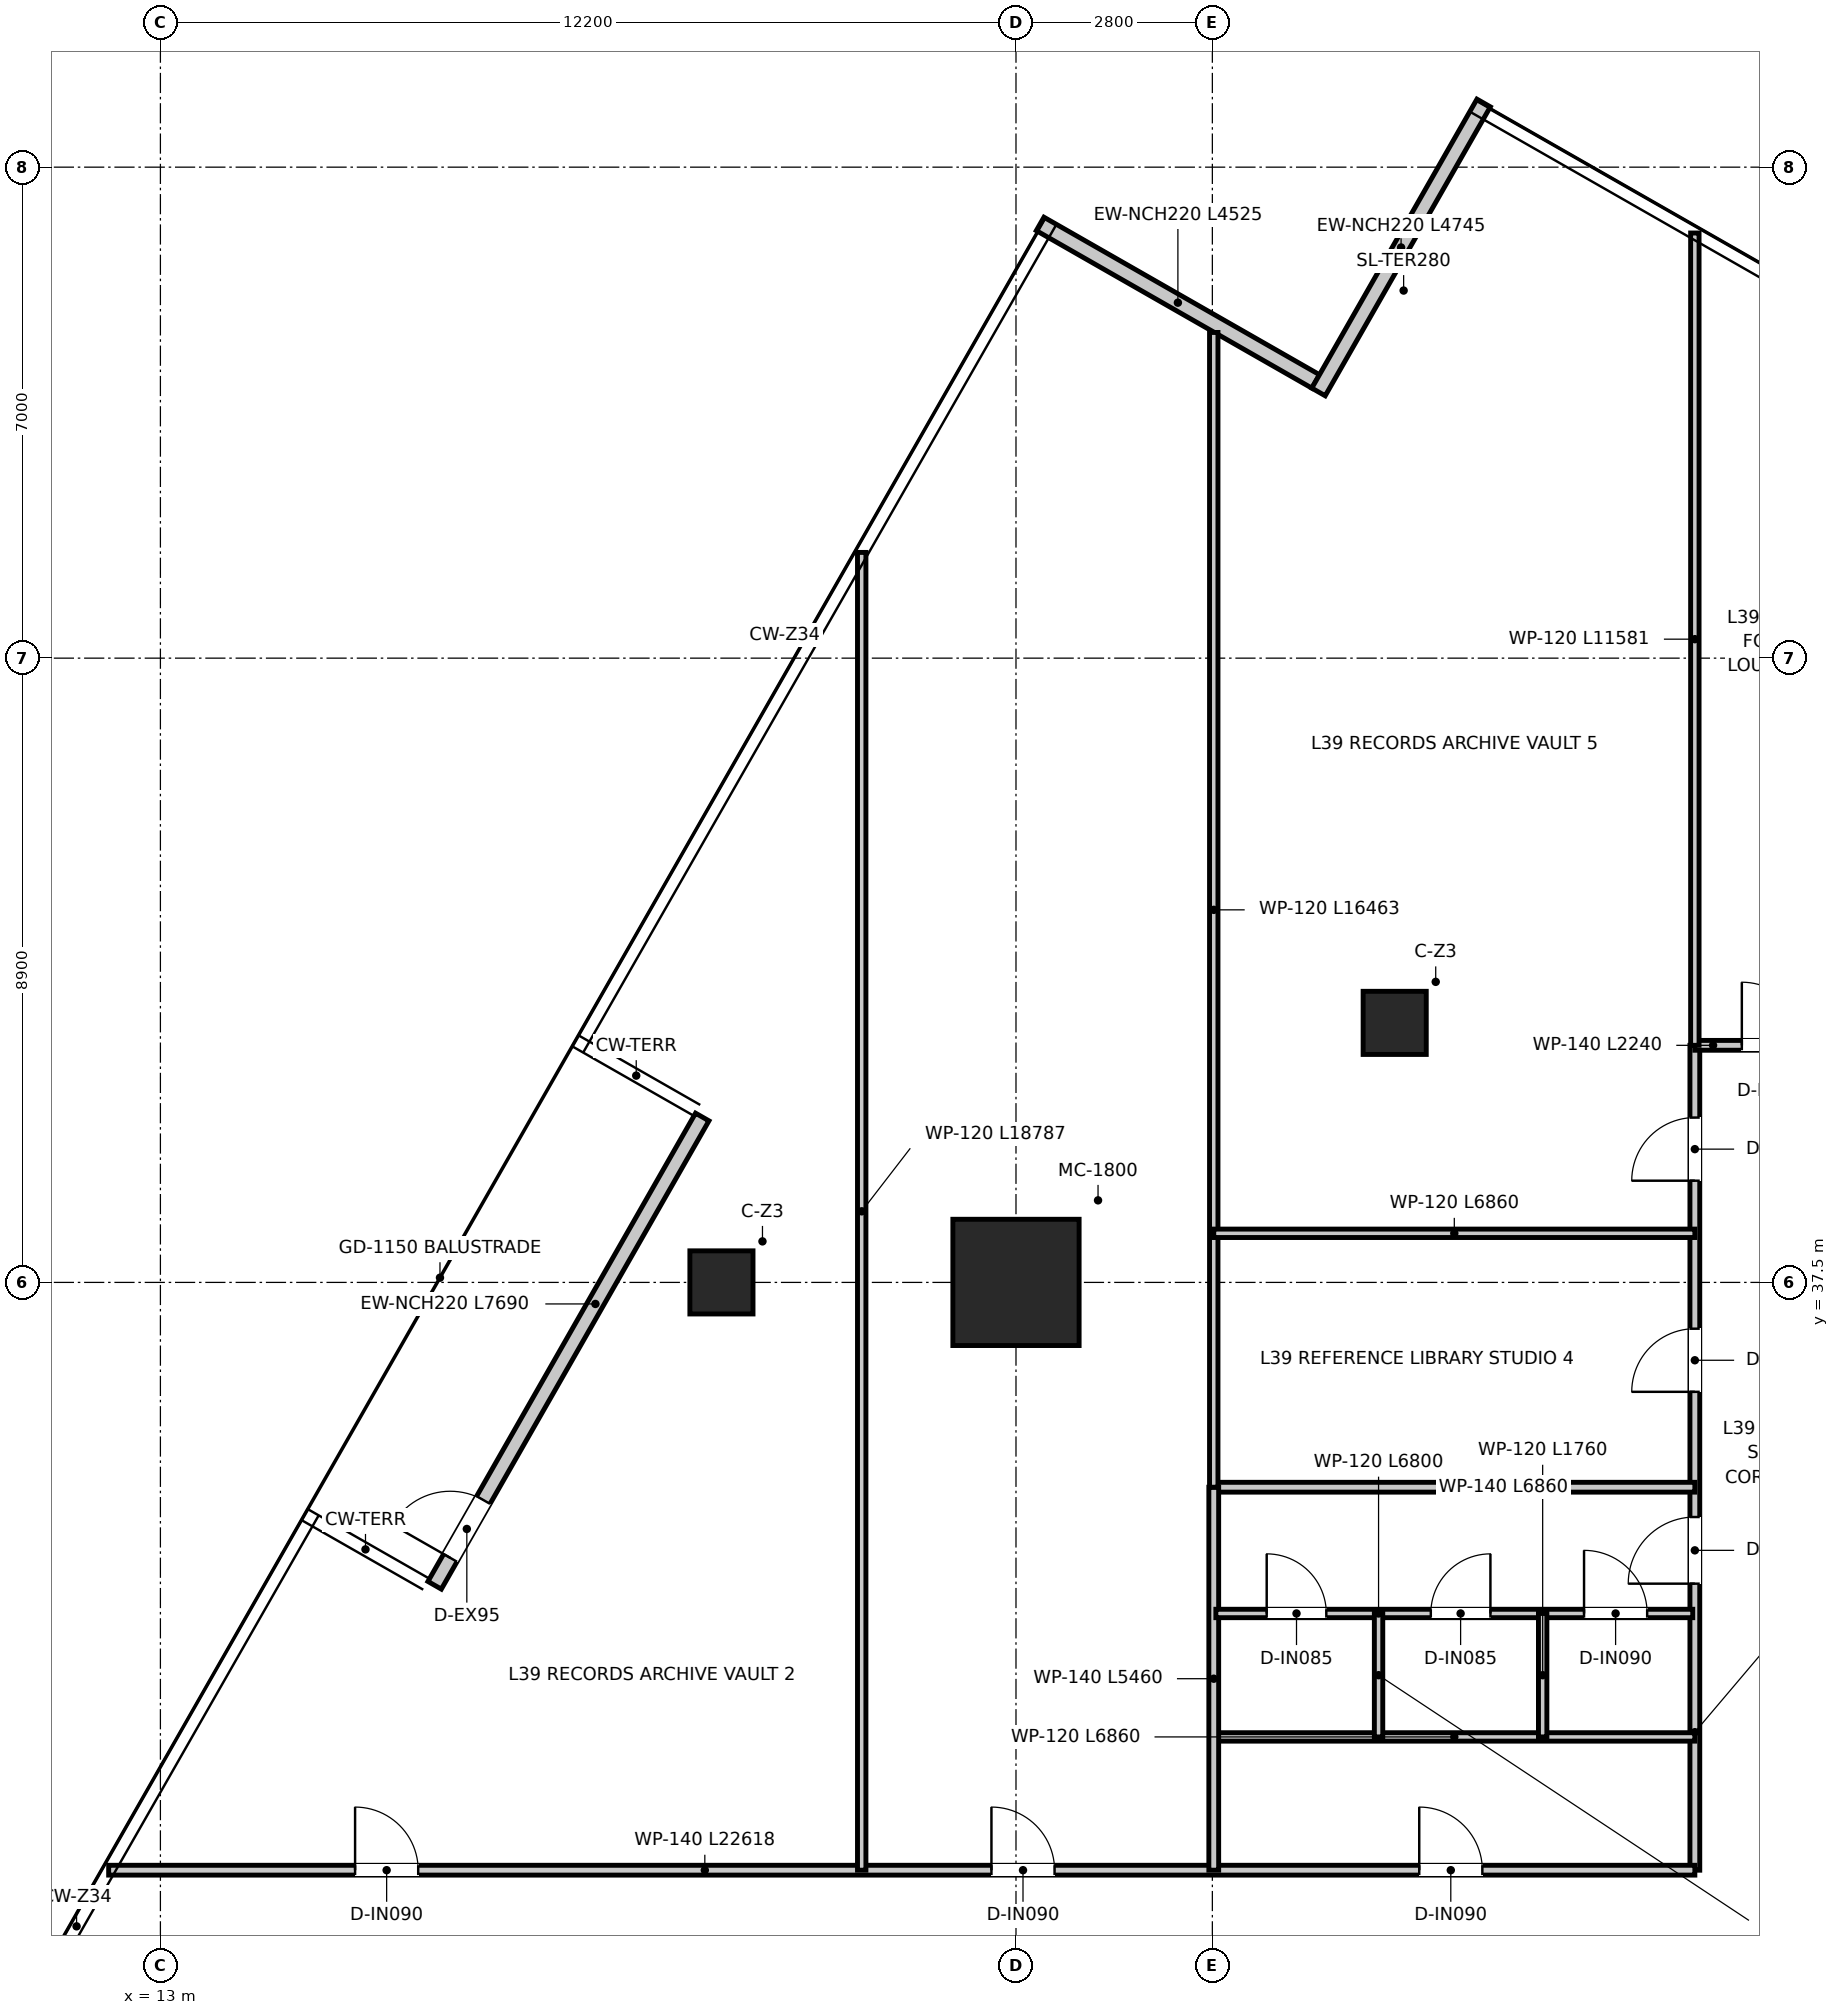
"""IFC4 building model, lengths in metres.
Left out: names, types, materials, properties, quantities, classifications, styles, units other than length and angle.
Written with IfcOpenShell. Run it as: python <this file> out.ifc"""

import sys

from ifc_helpers import new_model, si_unit, direction, frame, frame_2d, origin, origin_2d, place, context, subcontext, project, spatial, rectangle, extrude, source, transform, mapped, element, fill, save


model = new_model("IFC4")
c1 = context("Model", 3, precision=1e-05, world=origin(), true_north=direction((0.0, 1.0)))
c2 = subcontext(c1, "Body", "Model", "MODEL_VIEW")
j1 = project(units=[si_unit("LENGTHUNIT", "METRE"), si_unit("PLANEANGLEUNIT", "RADIAN")], contexts=[c1])
p1 = place(None, origin())
s1 = spatial("IfcSite", under=j1, at=p1, CompositionType="ELEMENT")
p2 = place(p1, origin())
s2 = spatial("IfcBuilding", under=s1, at=p2, CompositionType="ELEMENT")
p3 = place(p2, frame((0.0, 0.0, 162.0)))
s3 = spatial("IfcBuildingStorey", under=s2, at=p3, CompositionType="ELEMENT", Elevation=162.0)
m1 = source(origin(), c2, "Body", "SweptSolid", [
    extrude(rectangle(XDim=1.8, YDim=1.8, at=origin_2d()), origin(), (0.0, 0.0, 1.0), 3.95),
])
p4 = place(p3, frame((25.2, 37.5, 0.0), z_axis=(0.0, 0.0, 1.0), x_axis=(1.0, 0.0, 0.0)))
e1 = element("IfcColumn", 1, at=p4, inside=s3, PredefinedType="USERDEFINED", context=c2, shape_type="MappedRepresentation", body=[
    mapped(m1, transform((0.0, 0.0, 0.0), x_axis=(1.0, 0.0, 0.0), y_axis=(0.0, 1.0, 0.0), z_axis=(0.0, 0.0, 1.0), scale=1.0)),
])
m2 = source(origin(), c2, "Body", "SweptSolid", [
    extrude(rectangle(XDim=0.9, YDim=0.9, at=origin_2d()), origin(), (0.0, 0.0, 1.0), 3.95),
])
for number, where, z_axis, x_axis in (
    (2, (21.0, 37.5, 0.0), (0.0, 0.0, 1.0), (1.0, 0.0, 0.0)),
    (3, (30.6, 41.2, 0.0), (0.0, 0.0, 1.0), (1.0, 0.0, 0.0)),
):
    element("IfcColumn", number, at=place(p3, frame(where, z_axis=z_axis, x_axis=x_axis)), inside=s3, PredefinedType="COLUMN", context=c2, shape_type="MappedRepresentation", body=[
        mapped(m2, transform((0.0, 0.0, 0.0), x_axis=(1.0, 0.0, 0.0), y_axis=(0.0, 1.0, 0.0), z_axis=(0.0, 0.0, 1.0), scale=1.0)),
    ])
p5 = place(p3, frame((29.473, 50.345, 0.0), z_axis=(0.0, 0.0, 1.0), x_axis=(-0.868170087613, 0.496266761908, 0.0)))
e4 = element("IfcWall", 4, at=p5, inside=s3, PredefinedType="ELEMENTEDWALL", context=c2, shape_type="SweptSolid", body=[
    extrude(rectangle(XDim=4.525, YDim=0.22, at=frame_2d((2.262, 0.0))), origin(), (0.0, 0.0, 1.0), 3.67),
])
p6 = place(p3, frame((16.91, 33.182, 0.0), z_axis=(0.0, 0.0, 1.0), x_axis=(0.496214153759, 0.868200157572, 0.0)))
e5 = element("IfcWall", 5, at=p6, inside=s3, PredefinedType="ELEMENTEDWALL", context=c2, shape_type="SweptSolid", body=[
    extrude(rectangle(XDim=7.69, YDim=0.22, at=frame_2d((3.845, 0.0))), origin(), (0.0, 0.0, 1.0), 3.67),
])
p7 = place(p6, frame((0.45, 0.0, 0.0)))
e6 = element("IfcOpeningElement", 6, at=p7, cuts=e5, PredefinedType="OPENING", context=c2, shape_type="SweptSolid", body=[
    extrude(rectangle(XDim=0.95, YDim=2.1, at=frame_2d((0.475, 1.05))), frame((0.0, 0.12, 0.0), z_axis=(0.0, -1.0, 0.0), x_axis=(1.0, 0.0, 0.0)), (0.0, 0.0, 1.0), 0.24),
])
p8 = place(p3, frame((31.868, 54.315, 0.0), z_axis=(0.0, 0.0, 1.0), x_axis=(-0.496205429031, -0.868205144076, 0.0)))
e7 = element("IfcWall", 7, at=p8, inside=s3, PredefinedType="ELEMENTEDWALL", context=c2, shape_type="SweptSolid", body=[
    extrude(rectangle(XDim=4.745, YDim=0.22, at=frame_2d((2.373, 0.0))), origin(), (0.0, 0.0, 1.0), 3.67),
])
p9 = place(p3, frame((34.88, 29.12, 0.0), z_axis=(0.0, 0.0, 1.0), x_axis=(0.0, 1.0, 0.0)))
e8 = element("IfcWall", 8, at=p9, inside=s3, PredefinedType="PARTITIONING", context=c2, shape_type="SweptSolid", body=[
    extrude(rectangle(XDim=11.76, YDim=0.14, at=frame_2d((5.88, 0.0))), origin(), (0.0, 0.0, 1.0), 3.03),
])
p10 = place(p9, frame((4.085, 0.0, 0.0)))
e9 = element("IfcOpeningElement", 9, at=p10, cuts=e8, PredefinedType="OPENING", context=c2, shape_type="SweptSolid", body=[
    extrude(rectangle(XDim=0.95, YDim=2.1, at=frame_2d((0.475, 1.05))), frame((0.0, 0.08, 0.0), z_axis=(0.0, -1.0, 0.0), x_axis=(1.0, 0.0, 0.0)), (0.0, 0.0, 1.0), 0.16),
])
p11 = place(p9, frame((6.82, 0.0, 0.0)))
e10 = element("IfcOpeningElement", 10, at=p11, cuts=e8, PredefinedType="OPENING", context=c2, shape_type="SweptSolid", body=[
    extrude(rectangle(XDim=0.9, YDim=2.1, at=frame_2d((0.45, 1.05))), frame((0.0, 0.08, 0.0), z_axis=(0.0, -1.0, 0.0), x_axis=(1.0, 0.0, 0.0)), (0.0, 0.0, 1.0), 0.16),
])
p12 = place(p9, frame((9.83, 0.0, 0.0)))
e11 = element("IfcOpeningElement", 11, at=p12, cuts=e8, PredefinedType="OPENING", context=c2, shape_type="SweptSolid", body=[
    extrude(rectangle(XDim=0.9, YDim=2.1, at=frame_2d((0.45, 1.05))), frame((0.0, 0.08, 0.0), z_axis=(0.0, -1.0, 0.0), x_axis=(1.0, 0.0, 0.0)), (0.0, 0.0, 1.0), 0.16),
])
p13 = place(p3, frame((34.88, 40.88, 0.0), z_axis=(0.0, 0.0, 1.0), x_axis=(1.0, 0.0, 0.0)))
e12 = element("IfcWall", 12, at=p13, inside=s3, PredefinedType="PARTITIONING", context=c2, shape_type="SweptSolid", body=[
    extrude(rectangle(XDim=2.24, YDim=0.14, at=frame_2d((1.12, 0.0))), origin(), (0.0, 0.0, 1.0), 3.67),
])
p14 = place(p13, frame((0.67, 0.0, 0.0)))
e13 = element("IfcOpeningElement", 13, at=p14, cuts=e12, PredefinedType="OPENING", context=c2, shape_type="SweptSolid", body=[
    extrude(rectangle(XDim=0.9, YDim=2.1, at=frame_2d((0.45, 1.05))), frame((0.0, 0.08, 0.0), z_axis=(0.0, -1.0, 0.0), x_axis=(1.0, 0.0, 0.0)), (0.0, 0.0, 1.0), 0.16),
])
p15 = place(p3, frame((12.262, 29.12, 0.0), z_axis=(0.0, 0.0, 1.0), x_axis=(1.0, 0.0, 0.0)))
e14 = element("IfcWall", 14, at=p15, inside=s3, PredefinedType="PARTITIONING", context=c2, shape_type="SweptSolid", body=[
    extrude(rectangle(XDim=22.618, YDim=0.14, at=frame_2d((11.309, 0.0))), origin(), (0.0, 0.0, 1.0), 3.03),
])
p16 = place(p15, frame((18.688, 0.0, 0.0)))
e15 = element("IfcOpeningElement", 15, at=p16, cuts=e14, PredefinedType="OPENING", context=c2, shape_type="SweptSolid", body=[
    extrude(rectangle(XDim=0.9, YDim=2.1, at=frame_2d((0.45, 1.05))), frame((0.0, 0.08, 0.0), z_axis=(0.0, -1.0, 0.0), x_axis=(1.0, 0.0, 0.0)), (0.0, 0.0, 1.0), 0.16),
])
p17 = place(p15, frame((3.514, 0.0, 0.0)))
e16 = element("IfcOpeningElement", 16, at=p17, cuts=e14, PredefinedType="OPENING", context=c2, shape_type="SweptSolid", body=[
    extrude(rectangle(XDim=0.9, YDim=2.1, at=frame_2d((0.45, 1.05))), frame((0.0, 0.08, 0.0), z_axis=(0.0, -1.0, 0.0), x_axis=(1.0, 0.0, 0.0)), (0.0, 0.0, 1.0), 0.16),
])
p18 = place(p15, frame((12.588, 0.0, 0.0)))
e17 = element("IfcOpeningElement", 17, at=p18, cuts=e14, PredefinedType="OPENING", context=c2, shape_type="SweptSolid", body=[
    extrude(rectangle(XDim=0.9, YDim=2.1, at=frame_2d((0.45, 1.05))), frame((0.0, 0.08, 0.0), z_axis=(0.0, -1.0, 0.0), x_axis=(1.0, 0.0, 0.0)), (0.0, 0.0, 1.0), 0.16),
])
p19 = place(p3, frame((28.02, 31.02, 0.0), z_axis=(0.0, 0.0, 1.0), x_axis=(1.0, 0.0, 0.0)))
e18 = element("IfcWall", 18, at=p19, inside=s3, PredefinedType="PARTITIONING", context=c2, shape_type="SweptSolid", body=[
    extrude(rectangle(XDim=6.86, YDim=0.12, at=frame_2d((3.43, 0.0))), origin(), (0.0, 0.0, 1.0), 3.08),
])
p20 = place(p3, frame((28.02, 34.58, 0.0), z_axis=(0.0, 0.0, 1.0), x_axis=(1.0, 0.0, 0.0)))
e19 = element("IfcWall", 19, at=p20, inside=s3, PredefinedType="PARTITIONING", context=c2, shape_type="SweptSolid", body=[
    extrude(rectangle(XDim=6.86, YDim=0.14, at=frame_2d((3.43, 0.0))), origin(), (0.0, 0.0, 1.0), 3.08),
])
p21 = place(p3, frame((28.02, 29.12, 0.0), z_axis=(0.0, 0.0, 1.0), x_axis=(0.0, 1.0, 0.0)))
e20 = element("IfcWall", 20, at=p21, inside=s3, PredefinedType="PARTITIONING", context=c2, shape_type="SweptSolid", body=[
    extrude(rectangle(XDim=5.46, YDim=0.14, at=frame_2d((2.73, 0.0))), origin(), (0.0, 0.0, 1.0), 3.31),
])
p22 = place(p3, frame((28.05, 32.78, 0.0), z_axis=(0.0, 0.0, 1.0), x_axis=(1.0, 0.0, 0.0)))
e21 = element("IfcWall", 21, at=p22, inside=s3, PredefinedType="PARTITIONING", context=c2, shape_type="SweptSolid", body=[
    extrude(rectangle(XDim=6.8, YDim=0.12, at=frame_2d((3.4, 0.0))), origin(), (0.0, 0.0, 1.0), 3.08),
])
p23 = place(p22, frame((0.725, 0.0, 0.0)))
e22 = element("IfcOpeningElement", 22, at=p23, cuts=e21, PredefinedType="OPENING", context=c2, shape_type="SweptSolid", body=[
    extrude(rectangle(XDim=0.85, YDim=2.1, at=frame_2d((0.425, 1.05))), frame((0.0, 0.07, 0.0), z_axis=(0.0, -1.0, 0.0), x_axis=(1.0, 0.0, 0.0)), (0.0, 0.0, 1.0), 0.14),
])
p24 = place(p22, frame((3.065, 0.0, 0.0)))
e23 = element("IfcOpeningElement", 23, at=p24, cuts=e21, PredefinedType="OPENING", context=c2, shape_type="SweptSolid", body=[
    extrude(rectangle(XDim=0.85, YDim=2.1, at=frame_2d((0.425, 1.05))), frame((0.0, 0.07, 0.0), z_axis=(0.0, -1.0, 0.0), x_axis=(1.0, 0.0, 0.0)), (0.0, 0.0, 1.0), 0.14),
])
p25 = place(p22, frame((5.25, 0.0, 0.0)))
e24 = element("IfcOpeningElement", 24, at=p25, cuts=e21, PredefinedType="OPENING", context=c2, shape_type="SweptSolid", body=[
    extrude(rectangle(XDim=0.9, YDim=2.1, at=frame_2d((0.45, 1.05))), frame((0.0, 0.07, 0.0), z_axis=(0.0, -1.0, 0.0), x_axis=(1.0, 0.0, 0.0)), (0.0, 0.0, 1.0), 0.14),
])
p26 = place(p3, frame((30.37, 31.02, 0.0), z_axis=(0.0, 0.0, 1.0), x_axis=(0.0, 1.0, 0.0)))
e25 = element("IfcWall", 25, at=p26, inside=s3, PredefinedType="PARTITIONING", context=c2, shape_type="SweptSolid", body=[
    extrude(rectangle(XDim=1.76, YDim=0.12, at=frame_2d((0.88, 0.0))), origin(), (0.0, 0.0, 1.0), 3.08),
])
p27 = place(p3, frame((32.71, 31.02, 0.0), z_axis=(0.0, 0.0, 1.0), x_axis=(0.0, 1.0, 0.0)))
e26 = element("IfcWall", 26, at=p27, inside=s3, PredefinedType="PARTITIONING", context=c2, shape_type="SweptSolid", body=[
    extrude(rectangle(XDim=1.76, YDim=0.12, at=frame_2d((0.88, 0.0))), origin(), (0.0, 0.0, 1.0), 3.67),
])
p28 = place(p3, frame((34.88, 40.88, 0.0), z_axis=(0.0, 0.0, 1.0), x_axis=(0.0, 1.0, 0.0)))
e27 = element("IfcWall", 27, at=p28, inside=s3, PredefinedType="PARTITIONING", context=c2, shape_type="SweptSolid", body=[
    extrude(rectangle(XDim=11.581, YDim=0.12, at=frame_2d((5.791, 0.0))), origin(), (0.0, 0.0, 1.0), 3.28),
])
p29 = place(p3, frame((23.0, 29.12, 0.0), z_axis=(0.0, 0.0, 1.0), x_axis=(0.0, 1.0, 0.0)))
e28 = element("IfcWall", 28, at=p29, inside=s3, PredefinedType="PARTITIONING", context=c2, shape_type="SweptSolid", body=[
    extrude(rectangle(XDim=18.787, YDim=0.12, at=frame_2d((9.394, 0.0))), origin(), (0.0, 0.0, 1.0), 3.08),
])
p30 = place(p3, frame((28.02, 34.58, 0.0), z_axis=(0.0, 0.0, 1.0), x_axis=(0.0, 1.0, 0.0)))
e29 = element("IfcWall", 29, at=p30, inside=s3, PredefinedType="PARTITIONING", context=c2, shape_type="SweptSolid", body=[
    extrude(rectangle(XDim=16.463, YDim=0.12, at=frame_2d((8.231, 0.0))), origin(), (0.0, 0.0, 1.0), 3.03),
])
p31 = place(p3, frame((28.02, 38.2, 0.0), z_axis=(0.0, 0.0, 1.0), x_axis=(1.0, 0.0, 0.0)))
e30 = element("IfcWall", 30, at=p31, inside=s3, PredefinedType="PARTITIONING", context=c2, shape_type="SweptSolid", body=[
    extrude(rectangle(XDim=6.86, YDim=0.12, at=frame_2d((3.43, 0.0))), origin(), (0.0, 0.0, 1.0), 3.08),
])
p32 = place(p16, origin())
e31 = element("IfcDoor", 31, at=p32, inside=s3, OperationType="SINGLE_SWING_LEFT", PredefinedType="DOOR", context=c2, shape_type="SweptSolid", body=[
    extrude(rectangle(XDim=0.9, YDim=2.1, at=frame_2d((0.45, 1.05))), frame((0.0, 0.025, 0.0), z_axis=(0.0, -1.0, 0.0), x_axis=(1.0, 0.0, 0.0)), (0.0, 0.0, 1.0), 0.05),
])
fill(e15, e31)
p33 = place(p10, origin())
e32 = element("IfcDoor", 32, at=p33, inside=s3, OperationType="SINGLE_SWING_LEFT", PredefinedType="DOOR", context=c2, shape_type="SweptSolid", body=[
    extrude(rectangle(XDim=0.95, YDim=2.1, at=frame_2d((0.475, 1.05))), frame((0.0, 0.025, 0.0), z_axis=(0.0, -1.0, 0.0), x_axis=(1.0, 0.0, 0.0)), (0.0, 0.0, 1.0), 0.05),
])
fill(e9, e32)
p34 = place(p23, origin())
e33 = element("IfcDoor", 33, at=p34, inside=s3, OperationType="SINGLE_SWING_LEFT", PredefinedType="DOOR", context=c2, shape_type="SweptSolid", body=[
    extrude(rectangle(XDim=0.85, YDim=2.1, at=frame_2d((0.425, 1.05))), frame((0.0, 0.025, 0.0), z_axis=(0.0, -1.0, 0.0), x_axis=(1.0, 0.0, 0.0)), (0.0, 0.0, 1.0), 0.05),
])
fill(e22, e33)
p35 = place(p24, origin())
e34 = element("IfcDoor", 34, at=p35, inside=s3, OperationType="SINGLE_SWING_RIGHT", PredefinedType="DOOR", context=c2, shape_type="SweptSolid", body=[
    extrude(rectangle(XDim=0.85, YDim=2.1, at=frame_2d((0.425, 1.05))), frame((0.0, 0.025, 0.0), z_axis=(0.0, -1.0, 0.0), x_axis=(1.0, 0.0, 0.0)), (0.0, 0.0, 1.0), 0.05),
])
fill(e23, e34)
p36 = place(p25, origin())
e35 = element("IfcDoor", 35, at=p36, inside=s3, OperationType="SINGLE_SWING_LEFT", PredefinedType="DOOR", context=c2, shape_type="SweptSolid", body=[
    extrude(rectangle(XDim=0.9, YDim=2.1, at=frame_2d((0.45, 1.05))), frame((0.0, 0.025, 0.0), z_axis=(0.0, -1.0, 0.0), x_axis=(1.0, 0.0, 0.0)), (0.0, 0.0, 1.0), 0.05),
])
fill(e24, e35)
p37 = place(p14, origin())
e36 = element("IfcDoor", 36, at=p37, inside=s3, OperationType="SINGLE_SWING_LEFT", PredefinedType="DOOR", context=c2, shape_type="SweptSolid", body=[
    extrude(rectangle(XDim=0.9, YDim=2.1, at=frame_2d((0.45, 1.05))), frame((0.0, 0.025, 0.0), z_axis=(0.0, -1.0, 0.0), x_axis=(1.0, 0.0, 0.0)), (0.0, 0.0, 1.0), 0.05),
])
fill(e13, e36)
p38 = place(p17, origin())
e37 = element("IfcDoor", 37, at=p38, inside=s3, OperationType="SINGLE_SWING_LEFT", PredefinedType="DOOR", context=c2, shape_type="SweptSolid", body=[
    extrude(rectangle(XDim=0.9, YDim=2.1, at=frame_2d((0.45, 1.05))), frame((0.0, 0.025, 0.0), z_axis=(0.0, -1.0, 0.0), x_axis=(1.0, 0.0, 0.0)), (0.0, 0.0, 1.0), 0.05),
])
fill(e16, e37)
p39 = place(p18, origin())
e38 = element("IfcDoor", 38, at=p39, inside=s3, OperationType="SINGLE_SWING_LEFT", PredefinedType="DOOR", context=c2, shape_type="SweptSolid", body=[
    extrude(rectangle(XDim=0.9, YDim=2.1, at=frame_2d((0.45, 1.05))), frame((0.0, 0.025, 0.0), z_axis=(0.0, -1.0, 0.0), x_axis=(1.0, 0.0, 0.0)), (0.0, 0.0, 1.0), 0.05),
])
fill(e17, e38)
p40 = place(p11, origin())
e39 = element("IfcDoor", 39, at=p40, inside=s3, OperationType="SINGLE_SWING_LEFT", PredefinedType="DOOR", context=c2, shape_type="SweptSolid", body=[
    extrude(rectangle(XDim=0.9, YDim=2.1, at=frame_2d((0.45, 1.05))), frame((0.0, 0.025, 0.0), z_axis=(0.0, -1.0, 0.0), x_axis=(1.0, 0.0, 0.0)), (0.0, 0.0, 1.0), 0.05),
])
fill(e10, e39)
p41 = place(p12, origin())
e40 = element("IfcDoor", 40, at=p41, inside=s3, OperationType="SINGLE_SWING_LEFT", PredefinedType="DOOR", context=c2, shape_type="SweptSolid", body=[
    extrude(rectangle(XDim=0.9, YDim=2.1, at=frame_2d((0.45, 1.05))), frame((0.0, 0.025, 0.0), z_axis=(0.0, -1.0, 0.0), x_axis=(1.0, 0.0, 0.0)), (0.0, 0.0, 1.0), 0.05),
])
fill(e11, e40)
p42 = place(p7, origin())
e41 = element("IfcDoor", 41, at=p42, inside=s3, OperationType="SINGLE_SWING_LEFT", PredefinedType="DOOR", context=c2, shape_type="SweptSolid", body=[
    extrude(rectangle(XDim=0.95, YDim=2.1, at=frame_2d((0.475, 1.05))), frame((0.0, 0.025, 0.0), z_axis=(0.0, -1.0, 0.0), x_axis=(1.0, 0.0, 0.0)), (0.0, 0.0, 1.0), 0.05),
])
fill(e6, e41)
save(model, sys.argv[1])
